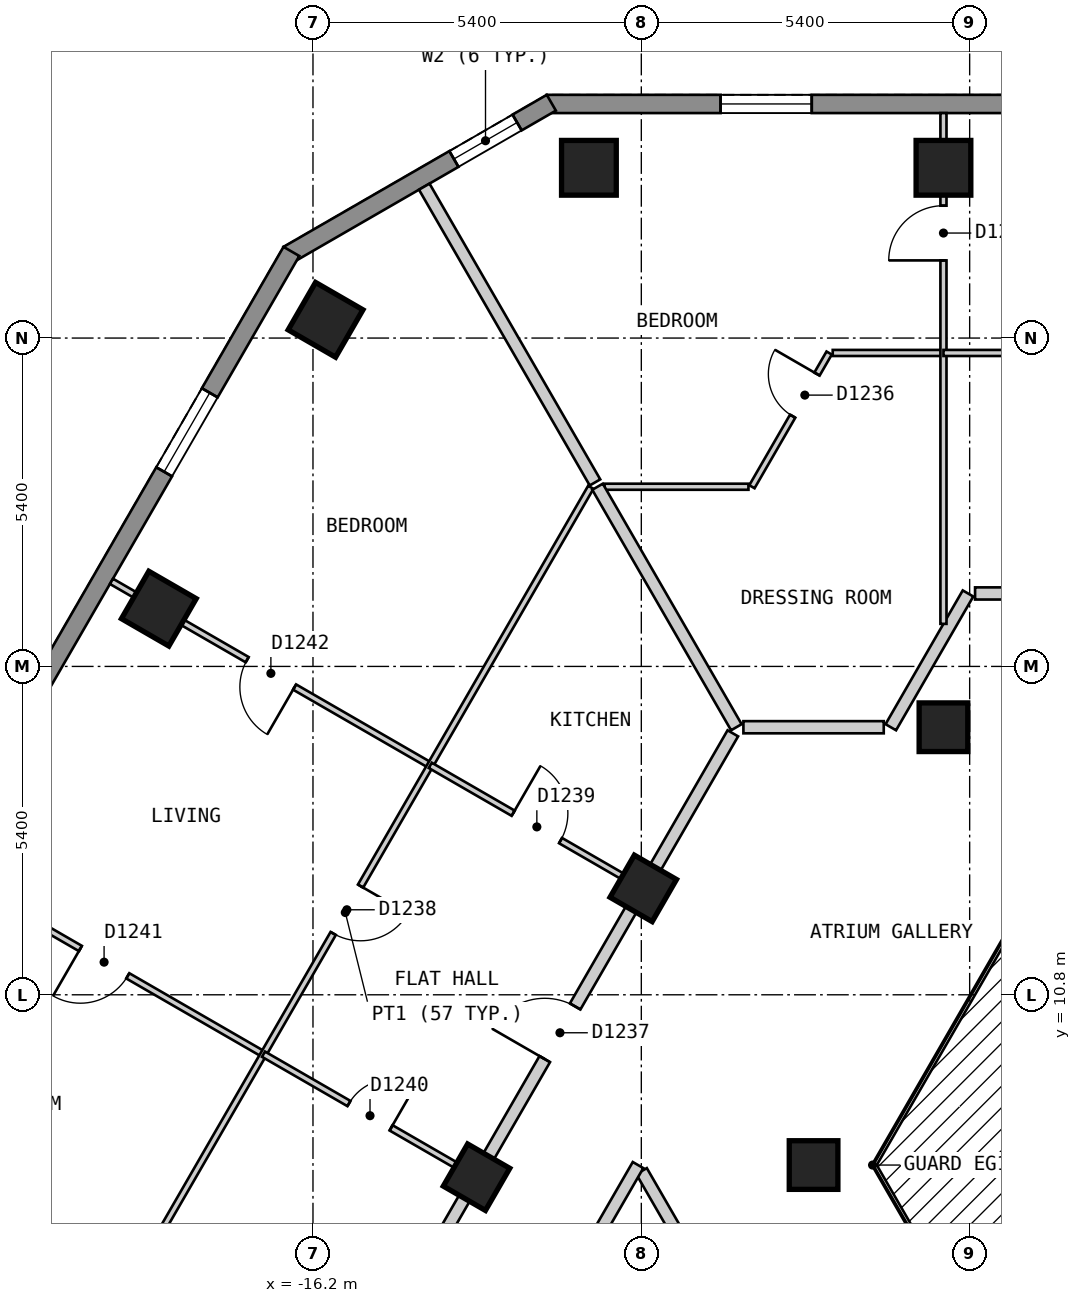
"""IFC4 building model, lengths in metres.
Left out: names, types, materials, properties, quantities, classifications, styles, units other than length and angle.
Written with IfcOpenShell. Run it as: python <this file> out.ifc"""

import sys

from ifc_helpers import new_model, si_unit, direction, frame, frame_2d, origin, origin_2d, place, context, subcontext, project, spatial, polyline, rectangle, outline, extrude, element, fill, save


model = new_model("IFC4")
c1 = context("Model", 3, precision=1e-05, world=origin(), true_north=direction((0.0, 1.0)))
c2 = subcontext(c1, "Body", "Model", "MODEL_VIEW")
j1 = project(units=[si_unit("LENGTHUNIT", "METRE"), si_unit("PLANEANGLEUNIT", "RADIAN")], contexts=[c1])
p1 = place(None, origin())
s1 = spatial("IfcSite", under=j1, at=p1, CompositionType="ELEMENT")
p2 = place(p1, origin())
s2 = spatial("IfcBuilding", under=s1, at=p2, CompositionType="ELEMENT")
p3 = place(p2, frame((0.0, 0.0, 129.6)))
s3 = spatial("IfcBuildingStorey", under=s2, at=p3, CompositionType="ELEMENT", Elevation=129.6)
for number, where, z_axis, x_axis in (
    (1, (-5.831, 24.4, 0.0), (0.0, 0.0, 1.0), (-1.0, 0.0, 0.0)),
    (2, (-11.662, 24.4, 0.0), (0.0, 0.0, 1.0), (-1.0, 0.0, 0.0)),
    (3, (-15.993, 21.9, 0.0), (0.0, 0.0, 1.0), (-0.5, -0.866, 0.0)),
    (4, (-18.735, 17.15, 0.0), (0.0, 0.0, 1.0), (-0.5, -0.866, 0.0)),
):
    element("IfcColumn", number, at=place(p3, frame(where, z_axis=z_axis, x_axis=x_axis)), inside=s3, PredefinedType="COLUMN", context=c2, shape_type="SweptSolid", body=[
        extrude(rectangle(XDim=0.9, YDim=0.9, at=origin_2d()), origin(), (0.0, 0.0, 1.0), 3.0),
    ])
for number, where, z_axis, x_axis in (
    (5, (-5.831, 15.2, 0.0), (0.0, 0.0, 1.0), (-1.0, 0.0, 0.0)),
    (6, (-10.768, 12.55, 0.0), (0.0, 0.0, 1.0), (-0.5, -0.866, 0.0)),
    (7, (-7.967, 8.0, 0.0), (0.0, 0.0, 1.0), (1.0, 0.0, 0.0)),
    (8, (-13.51, 7.8, 0.0), (0.0, 0.0, 1.0), (-0.5, -0.866, 0.0)),
):
    element("IfcColumn", number, at=place(p3, frame(where, z_axis=z_axis, x_axis=x_axis)), inside=s3, PredefinedType="COLUMN", context=c2, shape_type="SweptSolid", body=[
        extrude(rectangle(XDim=0.8, YDim=0.8, at=origin_2d()), origin(), (0.0, 0.0, 1.0), 3.0),
    ])
p4 = place(p3, frame((12.355, 25.45, 0.0), z_axis=(0.0, 0.0, 1.0), x_axis=(-1.0, 0.0, 0.0)))
e9 = element("IfcWall", 9, at=p4, inside=s3, PredefinedType="SOLIDWALL", context=c2, shape_type="SweptSolid", body=[
    extrude(outline(polyline([(0.0, -0.15), (24.71, -0.15), (24.63, 0.15), (0.08, 0.15), (0.0, -0.15)])), origin(), (0.0, 0.0, 1.0), 2.7),
])
p5 = place(p4, frame((2.858, 0.0, 0.15)))
e10 = element("IfcOpeningElement", 10, at=p5, cuts=e9, PredefinedType="OPENING", context=c2, shape_type="SweptSolid", body=[
    extrude(rectangle(XDim=1.5, YDim=2.1, at=frame_2d((0.75, 1.05))), frame((0.0, 0.16, 0.0), z_axis=(0.0, -1.0, 0.0), x_axis=(1.0, 0.0, 0.0)), (0.0, 0.0, 1.0), 0.32),
])
p6 = place(p4, frame((8.689, 0.0, 0.15)))
e11 = element("IfcOpeningElement", 11, at=p6, cuts=e9, PredefinedType="OPENING", context=c2, shape_type="SweptSolid", body=[
    extrude(rectangle(XDim=1.5, YDim=2.1, at=frame_2d((0.75, 1.05))), frame((0.0, 0.16, 0.0), z_axis=(0.0, -1.0, 0.0), x_axis=(1.0, 0.0, 0.0)), (0.0, 0.0, 1.0), 0.32),
])
p7 = place(p4, frame((14.521, 0.0, 0.15)))
e12 = element("IfcOpeningElement", 12, at=p7, cuts=e9, PredefinedType="OPENING", context=c2, shape_type="SweptSolid", body=[
    extrude(rectangle(XDim=1.5, YDim=2.1, at=frame_2d((0.75, 1.05))), frame((0.0, 0.16, 0.0), z_axis=(0.0, -1.0, 0.0), x_axis=(1.0, 0.0, 0.0)), (0.0, 0.0, 1.0), 0.32),
])
p8 = place(p4, frame((20.352, 0.0, 0.15)))
e13 = element("IfcOpeningElement", 13, at=p8, cuts=e9, PredefinedType="OPENING", context=c2, shape_type="SweptSolid", body=[
    extrude(rectangle(XDim=1.5, YDim=2.1, at=frame_2d((0.75, 1.05))), frame((0.0, 0.16, 0.0), z_axis=(0.0, -1.0, 0.0), x_axis=(1.0, 0.0, 0.0)), (0.0, 0.0, 1.0), 0.32),
])
p9 = place(p3, frame((-12.28, 25.47, 0.0), z_axis=(0.0, 0.0, 1.0), x_axis=(-0.866022959057, -0.500004234368, 0.0)))
e14 = element("IfcWall", 14, at=p9, inside=s3, PredefinedType="SOLIDWALL", context=c2, shape_type="SweptSolid", body=[
    extrude(outline(polyline([(0.0, -0.15), (5.0, -0.15), (4.92, 0.15), (0.08, 0.15), (0.0, -0.15)])), origin(), (0.0, 0.0, 1.0), 2.7),
])
p10 = place(p9, frame((0.65, 0.0, 0.15)))
e15 = element("IfcOpeningElement", 15, at=p10, cuts=e14, PredefinedType="OPENING", context=c2, shape_type="SweptSolid", body=[
    extrude(rectangle(XDim=1.2, YDim=2.1, at=frame_2d((0.6, 1.05))), frame((0.0, 0.16, 0.0), z_axis=(0.0, -1.0, 0.0), x_axis=(1.0, 0.0, 0.0)), (0.0, 0.0, 1.0), 0.32),
])
p11 = place(p3, frame((-16.555, 23.025, 0.0), z_axis=(0.0, 0.0, 1.0), x_axis=(-0.500020536353, -0.866013546791, 0.0)))
e16 = element("IfcWall", 16, at=p11, inside=s3, PredefinedType="SOLIDWALL", context=c2, shape_type="SweptSolid", body=[
    extrude(outline(polyline([(0.0, -0.15), (23.325, -0.15), (23.245, 0.15), (0.08, 0.15), (0.0, -0.15)])), origin(), (0.0, 0.0, 1.0), 2.7),
])
p12 = place(p11, frame((2.685, 0.0, 0.15)))
e17 = element("IfcOpeningElement", 17, at=p12, cuts=e16, PredefinedType="OPENING", context=c2, shape_type="SweptSolid", body=[
    extrude(rectangle(XDim=1.5, YDim=2.1, at=frame_2d((0.75, 1.05))), frame((0.0, 0.16, 0.0), z_axis=(0.0, -1.0, 0.0), x_axis=(1.0, 0.0, 0.0)), (0.0, 0.0, 1.0), 0.32),
])
p13 = place(p11, frame((8.171, 0.0, 0.15)))
e18 = element("IfcOpeningElement", 18, at=p13, cuts=e16, PredefinedType="OPENING", context=c2, shape_type="SweptSolid", body=[
    extrude(rectangle(XDim=1.5, YDim=2.1, at=frame_2d((0.75, 1.05))), frame((0.0, 0.16, 0.0), z_axis=(0.0, -1.0, 0.0), x_axis=(1.0, 0.0, 0.0)), (0.0, 0.0, 1.0), 0.32),
])
p14 = place(p11, frame((13.655, 0.0, 0.15)))
e19 = element("IfcOpeningElement", 19, at=p14, cuts=e16, PredefinedType="OPENING", context=c2, shape_type="SweptSolid", body=[
    extrude(rectangle(XDim=1.5, YDim=2.1, at=frame_2d((0.75, 1.05))), frame((0.0, 0.16, 0.0), z_axis=(0.0, -1.0, 0.0), x_axis=(1.0, 0.0, 0.0)), (0.0, 0.0, 1.0), 0.32),
])
p15 = place(p11, frame((19.14, 0.0, 0.15)))
e20 = element("IfcOpeningElement", 20, at=p15, cuts=e16, PredefinedType="OPENING", context=c2, shape_type="SweptSolid", body=[
    extrude(rectangle(XDim=1.5, YDim=2.1, at=frame_2d((0.75, 1.05))), frame((0.0, 0.16, 0.0), z_axis=(0.0, -1.0, 0.0), x_axis=(1.0, 0.0, 0.0)), (0.0, 0.0, 1.0), 0.32),
])
p16 = place(p3, frame((-10.796, 7.9, 0.0), z_axis=(0.0, 0.0, 1.0), x_axis=(0.499954271211, -0.866051803703, 0.0)))
e21 = element("IfcWall", 21, at=p16, inside=s3, PredefinedType="PARTITIONING", context=c2, shape_type="SweptSolid", body=[
    extrude(rectangle(XDim=7.536, YDim=0.2, at=frame_2d((3.768, 0.0))), origin(), (0.0, 0.0, 1.0), 2.7),
])
p17 = place(p3, frame((-9.121, 15.2, 0.0), z_axis=(0.0, 0.0, 1.0), x_axis=(1.0, 0.0, 0.0)))
e22 = element("IfcWall", 22, at=p17, inside=s3, PredefinedType="PARTITIONING", context=c2, shape_type="SweptSolid", body=[
    extrude(rectangle(XDim=2.308, YDim=0.2, at=frame_2d((1.154, 0.0))), origin(), (0.0, 0.0, 1.0), 2.7),
])
p18 = place(p3, frame((-5.311, 17.4, 0.0), z_axis=(0.0, 0.0, 1.0), x_axis=(1.0, 0.0, 0.0)))
e23 = element("IfcWall", 23, at=p18, inside=s3, PredefinedType="PARTITIONING", context=c2, shape_type="SweptSolid", body=[
    extrude(rectangle(XDim=10.738, YDim=0.2, at=frame_2d((5.369, 0.0))), origin(), (0.0, 0.0, 1.0), 2.7),
])
p19 = place(p18, frame((7.758, 0.0, 0.0)))
e24 = element("IfcOpeningElement", 24, at=p19, cuts=e23, PredefinedType="OPENING", context=c2, shape_type="SweptSolid", body=[
    extrude(rectangle(XDim=1.0, YDim=2.1, at=frame_2d((0.5, 1.05))), frame((0.0, 0.11, 0.0), z_axis=(0.0, -1.0, 0.0), x_axis=(1.0, 0.0, 0.0)), (0.0, 0.0, 1.0), 0.22),
])
p20 = place(p3, frame((-15.242, 0.399, 0.0), z_axis=(0.0, 0.0, 1.0), x_axis=(0.499953615651, 0.866052182145, 0.0)))
e25 = element("IfcWall", 25, at=p20, inside=s3, PredefinedType="PARTITIONING", context=c2, shape_type="SweptSolid", body=[
    extrude(rectangle(XDim=8.777, YDim=0.2, at=frame_2d((4.388, 0.0))), origin(), (0.0, 0.0, 1.0), 2.7),
])
p21 = place(p20, frame((3.938, 0.0, 0.0)))
e26 = element("IfcOpeningElement", 26, at=p21, cuts=e25, PredefinedType="OPENING", context=c2, shape_type="SweptSolid", body=[
    extrude(rectangle(XDim=0.9, YDim=2.1, at=frame_2d((0.45, 1.05))), frame((0.0, 0.11, 0.0), z_axis=(0.0, -1.0, 0.0), x_axis=(1.0, 0.0, 0.0)), (0.0, 0.0, 1.0), 0.22),
])
p22 = place(p3, frame((-6.697, 15.2, 0.0), z_axis=(0.0, 0.0, 1.0), x_axis=(0.499963722229, 0.866046347752, 0.0)))
e27 = element("IfcWall", 27, at=p22, inside=s3, PredefinedType="PARTITIONING", context=c2, shape_type="SweptSolid", body=[
    extrude(rectangle(XDim=2.54, YDim=0.2, at=frame_2d((1.27, 0.0))), origin(), (0.0, 0.0, 1.0), 2.7),
])
p23 = place(p3, frame((-17.753, 0.45, 0.0), z_axis=(0.0, 0.0, 1.0), x_axis=(0.499988552313, 0.866032013009, 0.0)))
e28 = element("IfcWall", 28, at=p23, inside=s3, PredefinedType="PARTITIONING", context=c2, shape_type="SweptSolid", body=[
    extrude(rectangle(XDim=16.917, YDim=0.2, at=frame_2d((8.458, 0.0))), origin(), (0.0, 0.0, 1.0), 2.7),
])
p24 = place(p23, frame((10.73, 0.0, 0.0)))
e29 = element("IfcOpeningElement", 29, at=p24, cuts=e28, PredefinedType="OPENING", context=c2, shape_type="SweptSolid", body=[
    extrude(rectangle(XDim=1.0, YDim=2.1, at=frame_2d((0.5, 1.05))), frame((0.0, 0.11, 0.0), z_axis=(0.0, -1.0, 0.0), x_axis=(1.0, 0.0, 0.0)), (0.0, 0.0, 1.0), 0.22),
])
p25 = place(p23, frame((0.594, 0.0, 0.0)))
e30 = element("IfcOpeningElement", 30, at=p25, cuts=e28, PredefinedType="OPENING", context=c2, shape_type="SweptSolid", body=[
    extrude(rectangle(XDim=1.0, YDim=2.1, at=frame_2d((0.5, 1.05))), frame((0.0, 0.11, 0.0), z_axis=(0.0, -1.0, 0.0), x_axis=(1.0, 0.0, 0.0)), (0.0, 0.0, 1.0), 0.22),
])
p26 = place(p3, frame((-22.257, 12.85, 0.0), z_axis=(0.0, 0.0, 1.0), x_axis=(0.866028448709, -0.499994725999, 0.0)))
e31 = element("IfcWall", 31, at=p26, inside=s3, PredefinedType="PARTITIONING", context=c2, shape_type="SweptSolid", body=[
    extrude(rectangle(XDim=6.054, YDim=0.1, at=frame_2d((3.027, 0.0))), origin(), (0.0, 0.0, 1.0), 2.7),
])
p27 = place(p26, frame((2.577, 0.0, 0.0)))
e32 = element("IfcOpeningElement", 32, at=p27, cuts=e31, PredefinedType="OPENING", context=c2, shape_type="SweptSolid", body=[
    extrude(rectangle(XDim=0.9, YDim=2.1, at=frame_2d((0.45, 1.05))), frame((0.0, 0.06, 0.0), z_axis=(0.0, -1.0, 0.0), x_axis=(1.0, 0.0, 0.0)), (0.0, 0.0, 1.0), 0.12),
])
p28 = place(p3, frame((-19.514, 17.599, 0.0), z_axis=(0.0, 0.0, 1.0), x_axis=(0.866088213453, -0.49989119468, 0.0)))
e33 = element("IfcWall", 33, at=p28, inside=s3, PredefinedType="PARTITIONING", context=c2, shape_type="SweptSolid", body=[
    extrude(rectangle(XDim=6.053, YDim=0.1, at=frame_2d((3.027, 0.0))), origin(), (0.0, 0.0, 1.0), 2.7),
])
p29 = place(p28, frame((2.577, 0.0, 0.0)))
e34 = element("IfcOpeningElement", 34, at=p29, cuts=e33, PredefinedType="OPENING", context=c2, shape_type="SweptSolid", body=[
    extrude(rectangle(XDim=0.9, YDim=2.1, at=frame_2d((0.45, 1.05))), frame((0.0, 0.06, 0.0), z_axis=(0.0, -1.0, 0.0), x_axis=(1.0, 0.0, 0.0)), (0.0, 0.0, 1.0), 0.12),
])
p30 = place(p3, frame((-11.405, 19.155, 0.0), z_axis=(0.0, 0.0, 1.0), x_axis=(1.0, 0.0, 0.0)))
e35 = element("IfcWall", 35, at=p30, inside=s3, PredefinedType="PARTITIONING", context=c2, shape_type="SweptSolid", body=[
    extrude(rectangle(XDim=2.367, YDim=0.1, at=frame_2d((1.184, 0.0))), origin(), (0.0, 0.0, 1.0), 2.7),
])
p31 = place(p3, frame((-7.652, 21.355, 0.0), z_axis=(0.0, 0.0, 1.0), x_axis=(1.0, 0.0, 0.0)))
e36 = element("IfcWall", 36, at=p31, inside=s3, PredefinedType="PARTITIONING", context=c2, shape_type="SweptSolid", body=[
    extrude(rectangle(XDim=1.821, YDim=0.1, at=frame_2d((0.911, 0.0))), origin(), (0.0, 0.0, 1.0), 2.7),
])
p32 = place(p3, frame((-8.981, 19.155, 0.0), z_axis=(0.0, 0.0, 1.0), x_axis=(0.500130227609, 0.865950203783, 0.0)))
e37 = element("IfcWall", 37, at=p32, inside=s3, PredefinedType="PARTITIONING", context=c2, shape_type="SweptSolid", body=[
    extrude(rectangle(XDim=2.539, YDim=0.1, at=frame_2d((1.27, 0.0))), origin(), (0.0, 0.0, 1.0), 2.7),
])
p33 = place(p32, frame((1.34, 0.0, 0.0)))
e38 = element("IfcOpeningElement", 38, at=p33, cuts=e37, PredefinedType="OPENING", context=c2, shape_type="SweptSolid", body=[
    extrude(rectangle(XDim=0.8, YDim=2.1, at=frame_2d((0.4, 1.05))), frame((0.0, 0.06, 0.0), z_axis=(0.0, -1.0, 0.0), x_axis=(1.0, 0.0, 0.0)), (0.0, 0.0, 1.0), 0.12),
])
p34 = place(p3, frame((-19.706, 5.16, 0.0), z_axis=(0.0, 0.0, 1.0), x_axis=(0.500003799672, 0.866023210032, 0.0)))
e39 = element("IfcWall", 39, at=p34, inside=s3, PredefinedType="PARTITIONING", context=c2, shape_type="SweptSolid", body=[
    extrude(rectangle(XDim=16.15, YDim=0.1, at=frame_2d((8.075, 0.0))), origin(), (0.0, 0.0, 1.0), 2.7),
])
p35 = place(p34, frame((7.677, 0.0, 0.0)))
e40 = element("IfcOpeningElement", 40, at=p35, cuts=e39, PredefinedType="OPENING", context=c2, shape_type="SweptSolid", body=[
    extrude(rectangle(XDim=0.9, YDim=2.1, at=frame_2d((0.45, 1.05))), frame((0.0, 0.06, 0.0), z_axis=(0.0, -1.0, 0.0), x_axis=(1.0, 0.0, 0.0)), (0.0, 0.0, 1.0), 0.12),
])
p36 = place(p3, frame((-5.831, 16.9, 0.0), z_axis=(0.0, 0.0, 1.0), x_axis=(0.0, 1.0, 0.0)))
e41 = element("IfcWall", 41, at=p36, inside=s3, PredefinedType="PARTITIONING", context=c2, shape_type="SweptSolid", body=[
    extrude(rectangle(XDim=8.4, YDim=0.1, at=frame_2d((4.2, 0.0))), origin(), (0.0, 0.0, 1.0), 2.7),
])
p37 = place(p36, frame((5.977, 0.0, 0.0)))
e42 = element("IfcOpeningElement", 42, at=p37, cuts=e41, PredefinedType="OPENING", context=c2, shape_type="SweptSolid", body=[
    extrude(rectangle(XDim=0.9, YDim=2.1, at=frame_2d((0.45, 1.05))), frame((0.0, 0.06, 0.0), z_axis=(0.0, -1.0, 0.0), x_axis=(1.0, 0.0, 0.0)), (0.0, 0.0, 1.0), 0.12),
])
p38 = place(p3, frame((-14.37, 24.09, 0.0), z_axis=(0.0, 0.0, 1.0), x_axis=(0.499982088007, -0.866035745032, 0.0)))
e43 = element("IfcWall", 43, at=p38, inside=s3, PredefinedType="PARTITIONING", context=c2, shape_type="SweptSolid", body=[
    extrude(rectangle(XDim=5.616, YDim=0.2, at=frame_2d((2.808, 0.0))), origin(), (0.0, 0.0, 1.0), 2.7),
])
p39 = place(p3, frame((-11.52, 19.155, 0.0), z_axis=(0.0, 0.0, 1.0), x_axis=(0.499916824138, -0.866073420066, 0.0)))
e44 = element("IfcWall", 44, at=p39, inside=s3, PredefinedType="PARTITIONING", context=c2, shape_type="SweptSolid", body=[
    extrude(rectangle(XDim=4.567, YDim=0.2, at=frame_2d((2.283, 0.0))), origin(), (0.0, 0.0, 1.0), 2.7),
])
p40 = place(p3, frame((-24.999, 8.1, 0.0), z_axis=(0.0, 0.0, 1.0), x_axis=(0.866013897511, -0.50001992892, 0.0)))
e45 = element("IfcWall", 45, at=p40, inside=s3, PredefinedType="PARTITIONING", context=c2, shape_type="SweptSolid", body=[
    extrude(rectangle(XDim=5.92, YDim=0.2, at=frame_2d((2.96, 0.0))), origin(), (0.0, 0.0, 1.0), 2.7),
])
p41 = place(p3, frame((-17.014, 9.823, 0.0), z_axis=(0.0, 0.0, 1.0), x_axis=(0.866076396086, -0.499911668341, 0.0)))
e46 = element("IfcWall", 46, at=p41, inside=s3, PredefinedType="PARTITIONING", context=c2, shape_type="SweptSolid", body=[
    extrude(rectangle(XDim=3.947, YDim=0.1, at=frame_2d((1.973, 0.0))), origin(), (0.0, 0.0, 1.0), 2.7),
])
p42 = place(p41, frame((1.623, 0.0, 0.0)))
e47 = element("IfcOpeningElement", 47, at=p42, cuts=e46, PredefinedType="OPENING", context=c2, shape_type="SweptSolid", body=[
    extrude(rectangle(XDim=0.8, YDim=2.1, at=frame_2d((0.4, 1.05))), frame((0.0, 0.06, 0.0), z_axis=(0.0, -1.0, 0.0), x_axis=(1.0, 0.0, 0.0)), (0.0, 0.0, 1.0), 0.12),
])
p43 = place(p3, frame((-14.271, 14.573, 0.0), z_axis=(0.0, 0.0, 1.0), x_axis=(0.866014535457, -0.500018824023, 0.0)))
e48 = element("IfcWall", 48, at=p43, inside=s3, PredefinedType="PARTITIONING", context=c2, shape_type="SweptSolid", body=[
    extrude(rectangle(XDim=3.946, YDim=0.1, at=frame_2d((1.973, 0.0))), origin(), (0.0, 0.0, 1.0), 2.7),
])
p44 = place(p43, frame((1.574, 0.0, 0.0)))
e49 = element("IfcOpeningElement", 49, at=p44, cuts=e48, PredefinedType="OPENING", context=c2, shape_type="SweptSolid", body=[
    extrude(rectangle(XDim=0.9, YDim=2.1, at=frame_2d((0.45, 1.05))), frame((0.0, 0.06, 0.0), z_axis=(0.0, -1.0, 0.0), x_axis=(1.0, 0.0, 0.0)), (0.0, 0.0, 1.0), 0.12),
])
p45 = place(p3, frame((-5.831, 21.355, 0.0), z_axis=(0.0, 0.0, 1.0), x_axis=(1.0, 0.0, 0.0)))
e50 = element("IfcWall", 50, at=p45, inside=s3, PredefinedType="PARTITIONING", context=c2, shape_type="SweptSolid", body=[
    extrude(rectangle(XDim=5.781, YDim=0.1, at=frame_2d((2.891, 0.0))), origin(), (0.0, 0.0, 1.0), 2.7),
])
p46 = place(p8, origin())
e51 = element("IfcWindow", 51, at=p46, inside=s3, PartitioningType="SINGLE_PANEL", PredefinedType="WINDOW", context=c2, shape_type="SweptSolid", body=[
    extrude(rectangle(XDim=1.5, YDim=2.1, at=frame_2d((0.75, 1.05))), frame((0.0, 0.03, 0.0), z_axis=(0.0, -1.0, 0.0), x_axis=(1.0, 0.0, 0.0)), (0.0, 0.0, 1.0), 0.06),
])
fill(e13, e51)
p47 = place(p10, origin())
e52 = element("IfcWindow", 52, at=p47, inside=s3, PartitioningType="SINGLE_PANEL", PredefinedType="WINDOW", context=c2, shape_type="SweptSolid", body=[
    extrude(rectangle(XDim=1.2, YDim=2.1, at=frame_2d((0.6, 1.05))), frame((0.0, 0.03, 0.0), z_axis=(0.0, -1.0, 0.0), x_axis=(1.0, 0.0, 0.0)), (0.0, 0.0, 1.0), 0.06),
])
fill(e15, e52)
p48 = place(p12, origin())
e53 = element("IfcWindow", 53, at=p48, inside=s3, PartitioningType="SINGLE_PANEL", PredefinedType="WINDOW", context=c2, shape_type="SweptSolid", body=[
    extrude(rectangle(XDim=1.5, YDim=2.1, at=frame_2d((0.75, 1.05))), frame((0.0, 0.03, 0.0), z_axis=(0.0, -1.0, 0.0), x_axis=(1.0, 0.0, 0.0)), (0.0, 0.0, 1.0), 0.06),
])
fill(e17, e53)
p49 = place(p37, origin())
e54 = element("IfcDoor", 54, at=p49, inside=s3, OperationType="SINGLE_SWING_LEFT", PredefinedType="DOOR", context=c2, shape_type="SweptSolid", body=[
    extrude(rectangle(XDim=0.9, YDim=2.1, at=frame_2d((0.45, 1.05))), frame((0.0, 0.025, 0.0), z_axis=(0.0, -1.0, 0.0), x_axis=(1.0, 0.0, 0.0)), (0.0, 0.0, 1.0), 0.05),
])
fill(e42, e54)
p50 = place(p33, origin())
e55 = element("IfcDoor", 55, at=p50, inside=s3, OperationType="SINGLE_SWING_RIGHT", PredefinedType="DOOR", context=c2, shape_type="SweptSolid", body=[
    extrude(rectangle(XDim=0.8, YDim=2.1, at=frame_2d((0.4, 1.05))), frame((0.0, 0.025, 0.0), z_axis=(0.0, -1.0, 0.0), x_axis=(1.0, 0.0, 0.0)), (0.0, 0.0, 1.0), 0.05),
])
fill(e38, e55)
p51 = place(p24, origin())
e56 = element("IfcDoor", 56, at=p51, inside=s3, OperationType="SINGLE_SWING_LEFT", PredefinedType="DOOR", context=c2, shape_type="SweptSolid", body=[
    extrude(rectangle(XDim=1.0, YDim=2.1, at=frame_2d((0.5, 1.05))), frame((0.0, 0.025, 0.0), z_axis=(0.0, -1.0, 0.0), x_axis=(1.0, 0.0, 0.0)), (0.0, 0.0, 1.0), 0.05),
])
fill(e29, e56)
p52 = place(p35, origin())
e57 = element("IfcDoor", 57, at=p52, inside=s3, OperationType="SINGLE_SWING_RIGHT", PredefinedType="DOOR", context=c2, shape_type="SweptSolid", body=[
    extrude(rectangle(XDim=0.9, YDim=2.1, at=frame_2d((0.45, 1.05))), frame((0.0, 0.025, 0.0), z_axis=(0.0, -1.0, 0.0), x_axis=(1.0, 0.0, 0.0)), (0.0, 0.0, 1.0), 0.05),
])
fill(e40, e57)
p53 = place(p44, origin())
e58 = element("IfcDoor", 58, at=p53, inside=s3, OperationType="SINGLE_SWING_LEFT", PredefinedType="DOOR", context=c2, shape_type="SweptSolid", body=[
    extrude(rectangle(XDim=0.9, YDim=2.1, at=frame_2d((0.45, 1.05))), frame((0.0, 0.025, 0.0), z_axis=(0.0, -1.0, 0.0), x_axis=(1.0, 0.0, 0.0)), (0.0, 0.0, 1.0), 0.05),
])
fill(e49, e58)
p54 = place(p42, origin())
e59 = element("IfcDoor", 59, at=p54, inside=s3, OperationType="SINGLE_SWING_RIGHT", PredefinedType="DOOR", context=c2, shape_type="SweptSolid", body=[
    extrude(rectangle(XDim=0.8, YDim=2.1, at=frame_2d((0.4, 1.05))), frame((0.0, 0.025, 0.0), z_axis=(0.0, -1.0, 0.0), x_axis=(1.0, 0.0, 0.0)), (0.0, 0.0, 1.0), 0.05),
])
fill(e47, e59)
p55 = place(p27, origin())
e60 = element("IfcDoor", 60, at=p55, inside=s3, OperationType="SINGLE_SWING_LEFT", PredefinedType="DOOR", context=c2, shape_type="SweptSolid", body=[
    extrude(rectangle(XDim=0.9, YDim=2.1, at=frame_2d((0.45, 1.05))), frame((0.0, 0.025, 0.0), z_axis=(0.0, -1.0, 0.0), x_axis=(1.0, 0.0, 0.0)), (0.0, 0.0, 1.0), 0.05),
])
fill(e32, e60)
p56 = place(p29, origin())
e61 = element("IfcDoor", 61, at=p56, inside=s3, OperationType="SINGLE_SWING_RIGHT", PredefinedType="DOOR", context=c2, shape_type="SweptSolid", body=[
    extrude(rectangle(XDim=0.9, YDim=2.1, at=frame_2d((0.45, 1.05))), frame((0.0, 0.025, 0.0), z_axis=(0.0, -1.0, 0.0), x_axis=(1.0, 0.0, 0.0)), (0.0, 0.0, 1.0), 0.05),
])
fill(e34, e61)
save(model, sys.argv[1])
